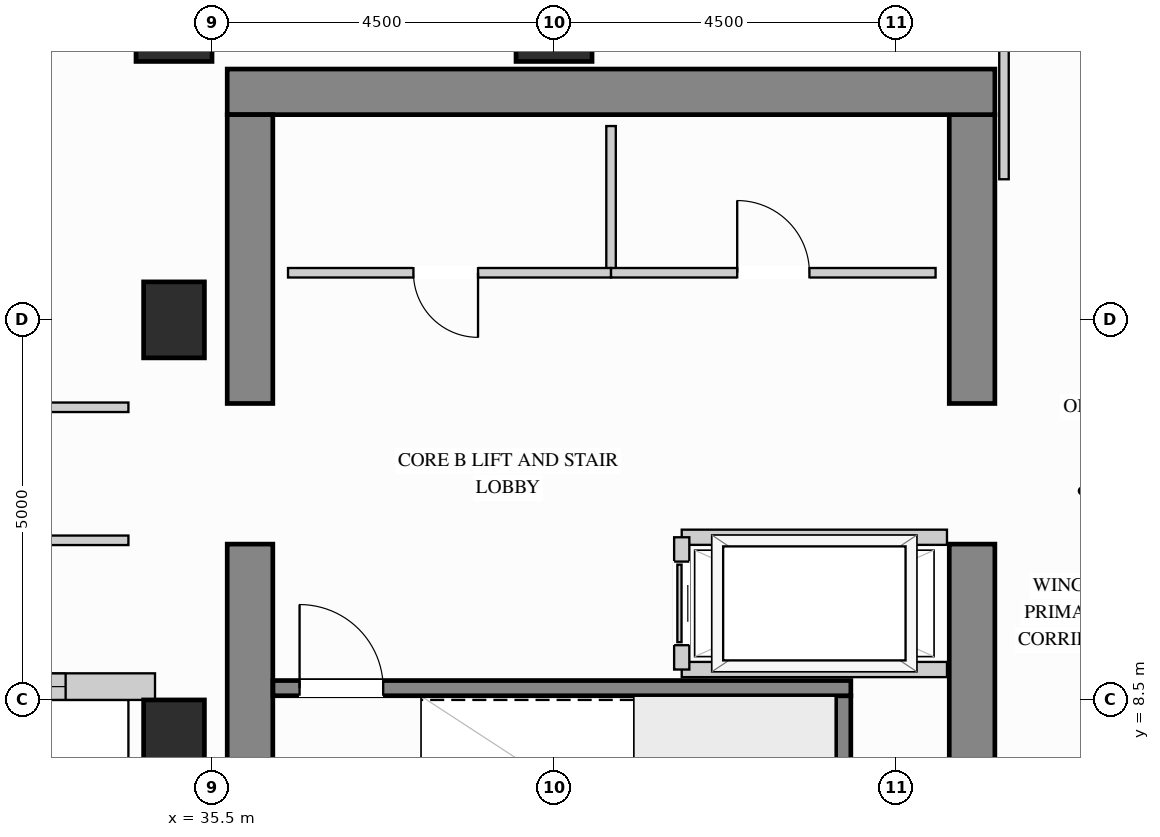
"""IFC4 building model, lengths in metres.
Left out: names, types, materials, properties, quantities, classifications, styles, units other than length and angle.
Written with IfcOpenShell. Run it as: python <this file> out.ifc"""

import sys

from ifc_helpers import new_model, si_unit, direction, frame, frame_2d, origin, origin_2d, place, context, subcontext, project, spatial, rectangle, extrude, source, transform, mapped, element, fill, save


model = new_model("IFC4")
c1 = context("Model", 3, precision=1e-05, world=origin(), true_north=direction((0.0, 1.0)))
c2 = subcontext(c1, "Body", "Model", "MODEL_VIEW")
j1 = project(units=[si_unit("LENGTHUNIT", "METRE"), si_unit("PLANEANGLEUNIT", "RADIAN")], contexts=[c1])
p1 = place(None, origin())
s1 = spatial("IfcSite", under=j1, at=p1, CompositionType="ELEMENT")
p2 = place(p1, origin())
s2 = spatial("IfcBuilding", under=s1, at=p2, CompositionType="ELEMENT")
p3 = place(p2, frame((0.0, 0.0, 182.7)))
s3 = spatial("IfcBuildingStorey", under=s2, at=p3, CompositionType="ELEMENT", Elevation=182.7)
m1 = source(origin(), c2, "Body", "SweptSolid", [
    extrude(rectangle(XDim=0.8, YDim=1.0, at=origin_2d()), origin(), (0.0, 0.0, 1.0), 3.4),
])
for number, where, z_axis, x_axis in (
    (1, (35.0, 13.5, 0.0), (0.0, 0.0, 1.0), (1.0, 0.0, 0.0)),
    (2, (35.0, 8.0, 0.0), (0.0, 0.0, 1.0), (1.0, 0.0, 0.0)),
):
    element("IfcColumn", number, at=place(p3, frame(where, z_axis=z_axis, x_axis=x_axis)), inside=s3, PredefinedType="COLUMN", context=c2, shape_type="MappedRepresentation", body=[
        mapped(m1, transform((0.0, 0.0, 0.0), x_axis=(1.0, 0.0, 0.0), y_axis=(0.0, 1.0, 0.0), z_axis=(0.0, 0.0, 1.0))),
    ])
m2 = source(origin(), c2, "Body", "SweptSolid", [
    extrude(rectangle(XDim=1.0, YDim=1.0, at=origin_2d()), origin(), (0.0, 0.0, 1.0), 3.4),
])
for number, where, z_axis, x_axis in (
    (3, (35.0, 17.4, 0.0), (0.0, 0.0, 1.0), (1.0, 0.0, 0.0)),
    (4, (40.0, 17.4, 0.0), (0.0, 0.0, 1.0), (1.0, 0.0, 0.0)),
):
    element("IfcColumn", number, at=place(p3, frame(where, z_axis=z_axis, x_axis=x_axis)), inside=s3, PredefinedType="COLUMN", context=c2, shape_type="MappedRepresentation", body=[
        mapped(m2, transform((0.0, 0.0, 0.0), x_axis=(1.0, 0.0, 0.0), y_axis=(0.0, 1.0, 0.0), z_axis=(0.0, 0.0, 1.0))),
    ])
m3 = source(origin(), c2, "Body", "SweptSolid", [
    extrude(rectangle(XDim=5.75, YDim=0.6, at=frame_2d((2.875, 0.0))), origin(), (0.0, 0.0, 1.0), 3.4),
])
p4 = place(p3, frame((45.5, 4.8, 0.0), z_axis=(0.0, 0.0, 1.0), x_axis=(0.0, 1.0, 0.0)))
e5 = element("IfcWall", 5, at=p4, inside=s3, PredefinedType="SHEAR", context=c2, shape_type="MappedRepresentation", body=[
    mapped(m3, transform((0.0, 0.0, 0.0), x_axis=(1.0, 0.0, 0.0), y_axis=(0.0, 1.0, 0.0), z_axis=(0.0, 0.0, 1.0))),
])
m4 = source(origin(), c2, "Body", "SweptSolid", [
    extrude(rectangle(XDim=3.8, YDim=0.6, at=frame_2d((1.9, 0.0))), origin(), (0.0, 0.0, 1.0), 3.4),
])
p5 = place(p3, frame((45.5, 12.4, 0.0), z_axis=(0.0, 0.0, 1.0), x_axis=(0.0, 1.0, 0.0)))
e6 = element("IfcWall", 6, at=p5, inside=s3, PredefinedType="SHEAR", context=c2, shape_type="MappedRepresentation", body=[
    mapped(m4, transform((0.0, 0.0, 0.0), x_axis=(1.0, 0.0, 0.0), y_axis=(0.0, 1.0, 0.0), z_axis=(0.0, 0.0, 1.0))),
])
m5 = source(origin(), c2, "Body", "SweptSolid", [
    extrude(rectangle(XDim=10.1, YDim=0.6, at=frame_2d((5.05, 0.0))), origin(), (0.0, 0.0, 1.0), 3.4),
])
p6 = place(p3, frame((35.7, 16.5, 0.0), z_axis=(0.0, 0.0, 1.0), x_axis=(1.0, 0.0, 0.0)))
e7 = element("IfcWall", 7, at=p6, inside=s3, PredefinedType="SHEAR", context=c2, shape_type="MappedRepresentation", body=[
    mapped(m5, transform((0.0, 0.0, 0.0), x_axis=(1.0, 0.0, 0.0), y_axis=(0.0, 1.0, 0.0), z_axis=(0.0, 0.0, 1.0))),
])
p7 = place(p3, frame((36.0, 4.8, 0.0), z_axis=(0.0, 0.0, 1.0), x_axis=(0.0, 1.0, 0.0)))
e8 = element("IfcWall", 8, at=p7, inside=s3, PredefinedType="SHEAR", context=c2, shape_type="MappedRepresentation", body=[
    mapped(m3, transform((0.0, 0.0, 0.0), x_axis=(1.0, 0.0, 0.0), y_axis=(0.0, 1.0, 0.0), z_axis=(0.0, 0.0, 1.0))),
])
p8 = place(p3, frame((36.0, 12.4, 0.0), z_axis=(0.0, 0.0, 1.0), x_axis=(0.0, 1.0, 0.0)))
e9 = element("IfcWall", 9, at=p8, inside=s3, PredefinedType="SHEAR", context=c2, shape_type="MappedRepresentation", body=[
    mapped(m4, transform((0.0, 0.0, 0.0), x_axis=(1.0, 0.0, 0.0), y_axis=(0.0, 1.0, 0.0), z_axis=(0.0, 0.0, 1.0))),
])
p9 = place(p3, frame((30.898, 8.675, 0.0), z_axis=(0.0, 0.0, 1.0), x_axis=(1.0, 0.0, 0.0)))
e10 = element("IfcWall", 10, at=p9, inside=s3, PredefinedType="SOLIDWALL", context=c2, shape_type="SweptSolid", body=[
    extrude(rectangle(XDim=3.852, YDim=0.35, at=frame_2d((1.926, 0.0))), origin(), (0.0, 0.0, 1.0), 3.385),
])
p10 = place(p9, frame((1.176, 0.0, 0.78)))
e11 = element("IfcOpeningElement", 11, at=p10, cuts=e10, PredefinedType="OPENING", context=c2, shape_type="SweptSolid", body=[
    extrude(rectangle(XDim=1.5, YDim=2.0, at=frame_2d((0.75, 1.0))), frame((0.0, 0.185, 0.0), z_axis=(0.0, -1.0, 0.0), x_axis=(1.0, 0.0, 0.0)), (0.0, 0.0, 1.0), 0.37),
])
m6 = source(origin(), c2, "Body", "SweptSolid", [
    extrude(rectangle(XDim=1.93, YDim=0.125, at=frame_2d((0.965, 0.0))), origin(), (0.0, 0.0, 1.0), 3.385),
])
p11 = place(p3, frame((40.75, 14.12, 0.0), z_axis=(0.0, 0.0, 1.0), x_axis=(0.0, 1.0, 0.0)))
e12 = element("IfcWall", 12, at=p11, inside=s3, PredefinedType="PARTITIONING", context=c2, shape_type="MappedRepresentation", body=[
    mapped(m6, transform((0.0, 0.0, 0.0), x_axis=(1.0, 0.0, 0.0), y_axis=(0.0, 1.0, 0.0), z_axis=(0.0, 0.0, 1.0))),
])
p12 = place(p3, frame((36.5, 14.12, 0.0), z_axis=(0.0, 0.0, 1.0), x_axis=(1.0, 0.0, 0.0)))
e13 = element("IfcWall", 13, at=p12, inside=s3, PredefinedType="PARTITIONING", context=c2, shape_type="SweptSolid", body=[
    extrude(rectangle(XDim=4.25, YDim=0.125, at=frame_2d((2.125, 0.0))), origin(), (0.0, 0.0, 1.0), 3.385),
])
p13 = place(p12, frame((1.65, 0.0, 0.0)))
e14 = element("IfcOpeningElement", 14, at=p13, cuts=e13, PredefinedType="OPENING", context=c2, shape_type="SweptSolid", body=[
    extrude(rectangle(XDim=0.85, YDim=2.1, at=frame_2d((0.425, 1.05))), frame((0.0, 0.073, 0.0), z_axis=(0.0, -1.0, 0.0), x_axis=(1.0, 0.0, 0.0)), (0.0, 0.0, 1.0), 0.145),
])
p14 = place(p3, frame((40.75, 14.12, 0.0), z_axis=(0.0, 0.0, 1.0), x_axis=(1.0, 0.0, 0.0)))
e15 = element("IfcWall", 15, at=p14, inside=s3, PredefinedType="PARTITIONING", context=c2, shape_type="SweptSolid", body=[
    extrude(rectangle(XDim=4.27, YDim=0.125, at=frame_2d((2.135, 0.0))), origin(), (0.0, 0.0, 1.0), 3.385),
])
p15 = place(p14, frame((1.66, 0.0, 0.0)))
e16 = element("IfcOpeningElement", 16, at=p15, cuts=e15, PredefinedType="OPENING", context=c2, shape_type="SweptSolid", body=[
    extrude(rectangle(XDim=0.95, YDim=2.15, at=frame_2d((0.475, 1.075))), frame((0.0, 0.073, 0.0), z_axis=(0.0, -1.0, 0.0), x_axis=(1.0, 0.0, 0.0)), (0.0, 0.0, 1.0), 0.145),
])
m7 = source(origin(), c2, "Body", "SweptSolid", [
    extrude(rectangle(XDim=2.298, YDim=0.125, at=frame_2d((1.149, 0.0))), origin(), (0.0, 0.0, 1.0), 3.385),
])
p16 = place(p3, frame((45.92, 15.35, 0.0), z_axis=(0.0, 0.0, 1.0), x_axis=(0.0, 1.0, 0.0)))
e17 = element("IfcWall", 17, at=p16, inside=s3, PredefinedType="PARTITIONING", context=c2, shape_type="MappedRepresentation", body=[
    mapped(m7, transform((0.0, 0.0, 0.0), x_axis=(1.0, 0.0, 0.0), y_axis=(0.0, 1.0, 0.0), z_axis=(0.0, 0.0, 1.0))),
])
p17 = place(p3, frame((29.85, 12.35, 0.0), z_axis=(0.0, 0.0, 1.0), x_axis=(1.0, 0.0, 0.0)))
e18 = element("IfcWall", 18, at=p17, inside=s3, PredefinedType="PARTITIONING", context=c2, shape_type="SweptSolid", body=[
    extrude(rectangle(XDim=4.55, YDim=0.125, at=frame_2d((2.275, 0.0))), origin(), (0.0, 0.0, 1.0), 3.385),
])
p18 = place(p17, frame((1.8, 0.0, 0.0)))
e19 = element("IfcOpeningElement", 19, at=p18, cuts=e18, PredefinedType="OPENING", context=c2, shape_type="SweptSolid", body=[
    extrude(rectangle(XDim=0.95, YDim=2.15, at=frame_2d((0.475, 1.075))), frame((0.0, 0.073, 0.0), z_axis=(0.0, -1.0, 0.0), x_axis=(1.0, 0.0, 0.0)), (0.0, 0.0, 1.0), 0.145),
])
p19 = place(p3, frame((26.95, 10.6, 0.0), z_axis=(0.0, 0.0, 1.0), x_axis=(1.0, 0.0, 0.0)))
e20 = element("IfcWall", 20, at=p19, inside=s3, PredefinedType="PARTITIONING", context=c2, shape_type="SweptSolid", body=[
    extrude(rectangle(XDim=7.45, YDim=0.125, at=frame_2d((3.725, 0.0))), origin(), (0.0, 0.0, 1.0), 3.385),
])
p20 = place(p19, frame((4.478, 0.0, 0.0)))
e21 = element("IfcOpeningElement", 21, at=p20, cuts=e20, PredefinedType="OPENING", context=c2, shape_type="SweptSolid", body=[
    extrude(rectangle(XDim=0.95, YDim=2.15, at=frame_2d((0.475, 1.075))), frame((0.0, 0.073, 0.0), z_axis=(0.0, -1.0, 0.0), x_axis=(1.0, 0.0, 0.0)), (0.0, 0.0, 1.0), 0.145),
])
m8 = source(origin(), c2, "Body", "SweptSolid", [
    extrude(rectangle(XDim=3.49, YDim=0.2, at=frame_2d((1.745, 0.0))), origin(), (0.0, 0.0, 1.0), 3.385),
])
for number, where, z_axis, x_axis in (
    (22, (41.68, 10.64, 0.0), (0.0, 0.0, 1.0), (1.0, 0.0, 0.0)),
    (23, (41.68, 8.9, 0.0), (0.0, 0.0, 1.0), (1.0, 0.0, 0.0)),
):
    element("IfcWall", number, at=place(p3, frame(where, z_axis=z_axis, x_axis=x_axis)), inside=s3, PredefinedType="PARTITIONING", context=c2, shape_type="MappedRepresentation", body=[
        mapped(m8, transform((0.0, 0.0, 0.0), x_axis=(1.0, 0.0, 0.0), y_axis=(0.0, 1.0, 0.0), z_axis=(0.0, 0.0, 1.0))),
    ])
p21 = place(p3, frame((41.68, 8.9, 0.0), z_axis=(0.0, 0.0, 1.0), x_axis=(0.0, 1.0, 0.0)))
e24 = element("IfcWall", 24, at=p21, inside=s3, PredefinedType="PARTITIONING", context=c2, shape_type="SweptSolid", body=[
    extrude(rectangle(XDim=1.74, YDim=0.2, at=frame_2d((0.87, 0.0))), origin(), (0.0, 0.0, 1.0), 3.385),
])
p22 = place(p21, frame((0.32, 0.0, 0.0)))
e25 = element("IfcOpeningElement", 25, at=p22, cuts=e24, PredefinedType="OPENING", context=c2, shape_type="SweptSolid", body=[
    extrude(rectangle(XDim=1.1, YDim=2.2, at=frame_2d((0.55, 1.1))), frame((0.0, 0.11, 0.0), z_axis=(0.0, -1.0, 0.0), x_axis=(1.0, 0.0, 0.0)), (0.0, 0.0, 1.0), 0.22),
])
m9 = source(origin(), c2, "Body", "SweptSolid", [
    extrude(rectangle(XDim=3.753, YDim=0.2, at=frame_2d((1.876, 0.0))), origin(), (0.0, 0.0, 1.0), 3.4),
])
p23 = place(p3, frame((43.805, 4.802, 0.0), z_axis=(0.0, 0.0, 1.0), x_axis=(0.0, 1.0, 0.0)))
e26 = element("IfcWall", 26, at=p23, inside=s3, PredefinedType="SHEAR", context=c2, shape_type="MappedRepresentation", body=[
    mapped(m9, transform((0.0, 0.0, 0.0), x_axis=(1.0, 0.0, 0.0), y_axis=(0.0, 1.0, 0.0), z_axis=(0.0, 0.0, 1.0))),
])
p24 = place(p3, frame((36.302, 8.655, 0.0), z_axis=(0.0, 0.0, 1.0), x_axis=(1.0, 0.0, 0.0)))
e27 = element("IfcWall", 27, at=p24, inside=s3, PredefinedType="SHEAR", context=c2, shape_type="SweptSolid", body=[
    extrude(rectangle(XDim=7.603, YDim=0.2, at=frame_2d((3.802, 0.0))), origin(), (0.0, 0.0, 1.0), 3.4),
])
p25 = place(p24, frame((0.35, 0.0, 0.0)))
e28 = element("IfcOpeningElement", 28, at=p25, cuts=e27, PredefinedType="OPENING", context=c2, shape_type="SweptSolid", body=[
    extrude(rectangle(XDim=1.1, YDim=2.15, at=frame_2d((0.55, 1.075))), frame((0.0, 0.11, 0.0), z_axis=(0.0, -1.0, 0.0), x_axis=(1.0, 0.0, 0.0)), (0.0, 0.0, 1.0), 0.22),
])
m10 = source(origin(), c2, "Body", "SweptSolid", [
    extrude(rectangle(XDim=1.1, YDim=2.2, at=frame_2d((0.55, 1.1))), frame((0.0, 0.025, 0.0), z_axis=(0.0, -1.0, 0.0), x_axis=(1.0, 0.0, 0.0)), (0.0, 0.0, 1.0), 0.05),
])
p26 = place(p22, origin())
e29 = element("IfcDoor", 29, at=p26, inside=s3, OperationType="SLIDING_TO_LEFT", PredefinedType="DOOR", context=c2, shape_type="MappedRepresentation", body=[
    mapped(m10, transform((0.0, 0.0, 0.0), x_axis=(1.0, 0.0, 0.0), y_axis=(0.0, 1.0, 0.0), z_axis=(0.0, 0.0, 1.0))),
])
fill(e25, e29)
m11 = source(origin(), c2, "Body", "SweptSolid", [
    extrude(rectangle(XDim=0.95, YDim=2.15, at=frame_2d((0.475, 1.075))), frame((0.0, 0.025, 0.0), z_axis=(0.0, -1.0, 0.0), x_axis=(1.0, 0.0, 0.0)), (0.0, 0.0, 1.0), 0.05),
])
p27 = place(p15, origin())
e30 = element("IfcDoor", 30, at=p27, inside=s3, OperationType="SINGLE_SWING_LEFT", PredefinedType="DOOR", context=c2, shape_type="MappedRepresentation", body=[
    mapped(m11, transform((0.0, 0.0, 0.0), x_axis=(1.0, 0.0, 0.0), y_axis=(0.0, 1.0, 0.0), z_axis=(0.0, 0.0, 1.0))),
])
fill(e16, e30)
m12 = source(origin(), c2, "Body", "SweptSolid", [
    extrude(rectangle(XDim=0.85, YDim=2.1, at=frame_2d((0.425, 1.05))), frame((0.0, 0.025, 0.0), z_axis=(0.0, -1.0, 0.0), x_axis=(1.0, 0.0, 0.0)), (0.0, 0.0, 1.0), 0.05),
])
p28 = place(p13, origin())
e31 = element("IfcDoor", 31, at=p28, inside=s3, OperationType="SINGLE_SWING_RIGHT", PredefinedType="DOOR", context=c2, shape_type="MappedRepresentation", body=[
    mapped(m12, transform((0.0, 0.0, 0.0), x_axis=(1.0, 0.0, 0.0), y_axis=(0.0, 1.0, 0.0), z_axis=(0.0, 0.0, 1.0))),
])
fill(e14, e31)
m13 = source(origin(), c2, "Body", "SweptSolid", [
    extrude(rectangle(XDim=1.1, YDim=2.15, at=frame_2d((0.55, 1.075))), frame((0.0, 0.025, 0.0), z_axis=(0.0, -1.0, 0.0), x_axis=(1.0, 0.0, 0.0)), (0.0, 0.0, 1.0), 0.05),
])
p29 = place(p25, origin())
e32 = element("IfcDoor", 32, at=p29, inside=s3, OperationType="SINGLE_SWING_LEFT", PredefinedType="DOOR", context=c2, shape_type="MappedRepresentation", body=[
    mapped(m13, transform((0.0, 0.0, 0.0), x_axis=(1.0, 0.0, 0.0), y_axis=(0.0, 1.0, 0.0), z_axis=(0.0, 0.0, 1.0))),
])
fill(e28, e32)
m14 = source(origin(), c2, "Body", "SweptSolid", [
    extrude(rectangle(XDim=1.5, YDim=2.0, at=frame_2d((0.75, 1.0))), frame((0.0, 0.03, 0.0), z_axis=(0.0, -1.0, 0.0), x_axis=(1.0, 0.0, 0.0)), (0.0, 0.0, 1.0), 0.06),
])
p30 = place(p10, origin())
e33 = element("IfcWindow", 33, at=p30, inside=s3, PartitioningType="SINGLE_PANEL", PredefinedType="WINDOW", context=c2, shape_type="MappedRepresentation", body=[
    mapped(m14, transform((0.0, 0.0, 0.0), x_axis=(1.0, 0.0, 0.0), y_axis=(0.0, 1.0, 0.0), z_axis=(0.0, 0.0, 1.0))),
])
fill(e11, e33)
save(model, sys.argv[1])
